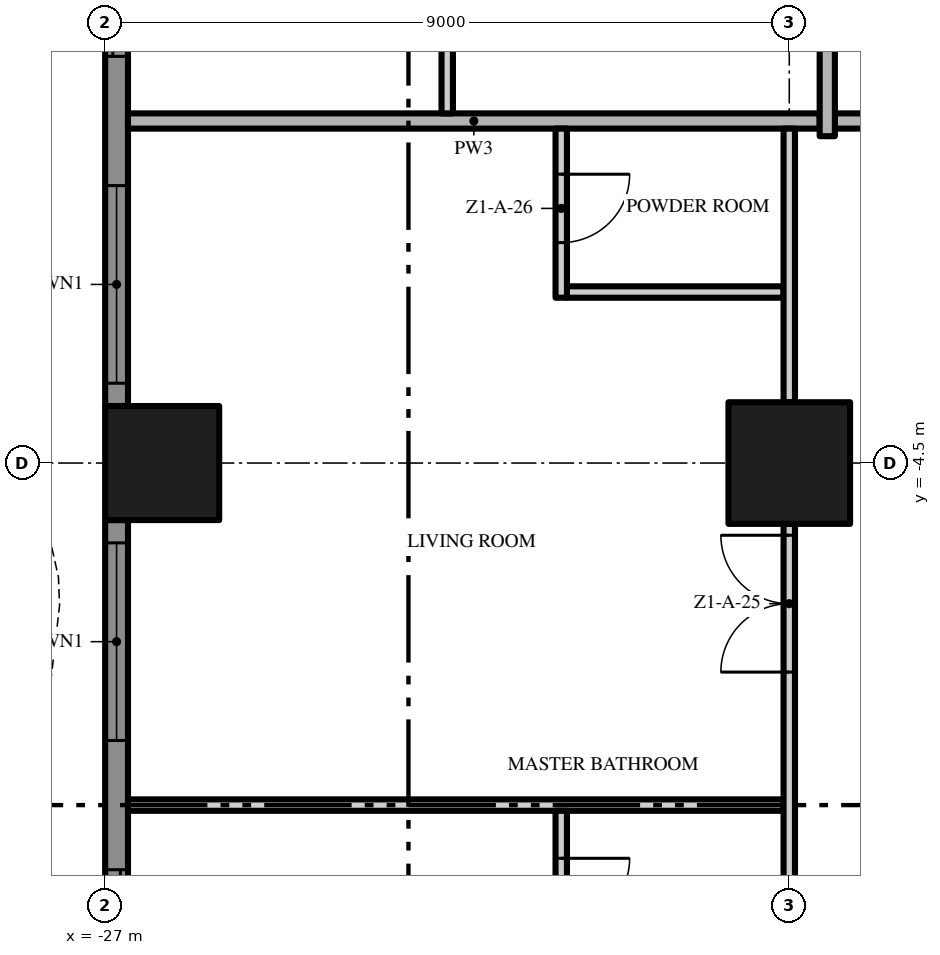
"""IFC4 building model, lengths in metres.
Left out: names, types, materials, properties, quantities, classifications, styles, units other than length and angle.
Written with IfcOpenShell. Run it as: python <this file> out.ifc"""

import sys

from ifc_helpers import new_model, si_unit, direction, frame, frame_2d, origin, origin_2d, place, context, subcontext, project, spatial, polyline, rectangle, outline, extrude, element, fill, save


model = new_model("IFC4")
c1 = context("Model", 3, precision=1e-05, world=origin(), true_north=direction((0.0, 1.0)))
c2 = subcontext(c1, "Body", "Model", "MODEL_VIEW")
j1 = project(units=[si_unit("LENGTHUNIT", "METRE"), si_unit("PLANEANGLEUNIT", "RADIAN")], contexts=[c1])
p1 = place(None, origin())
s1 = spatial("IfcSite", under=j1, at=p1, CompositionType="ELEMENT")
p2 = place(p1, origin())
s2 = spatial("IfcBuilding", under=s1, at=p2, CompositionType="ELEMENT")
p3 = place(p2, frame((0.0, 0.0, 18.8)))
s3 = spatial("IfcBuildingStorey", under=s2, at=p3, CompositionType="ELEMENT", Elevation=18.8)
p4 = place(p3, frame((-18.0, -4.5, 0.0), z_axis=(0.0, 0.0, 1.0), x_axis=(1.0, 0.0, 0.0)))
e1 = element("IfcColumn", 1, at=p4, inside=s3, PredefinedType="COLUMN", context=c2, shape_type="SweptSolid", body=[
    extrude(rectangle(XDim=1.6, YDim=1.6, at=origin_2d()), origin(), (0.0, 0.0, 1.0), 3.5),
])
p5 = place(p3, frame((-26.25, -4.5, 0.0), z_axis=(0.0, 0.0, 1.0), x_axis=(1.0, 0.0, 0.0)))
e2 = element("IfcColumn", 2, at=p5, inside=s3, PredefinedType="COLUMN", context=c2, shape_type="SweptSolid", body=[
    extrude(rectangle(XDim=1.5, YDim=1.5, at=origin_2d()), origin(), (0.0, 0.0, 1.0), 3.5),
])
p6 = place(p3, frame((-26.85, -3.75, 0.0), z_axis=(0.0, 0.0, 1.0), x_axis=(0.0, 1.0, 0.0)))
e3 = element("IfcWall", 3, at=p6, inside=s3, PredefinedType="SOLIDWALL", context=c2, shape_type="SweptSolid", body=[
    extrude(rectangle(XDim=7.5, YDim=0.3, at=frame_2d((3.75, 0.0))), origin(), (0.0, 0.0, 1.0), 3.5),
])
p7 = place(p6, frame((4.6, 0.0, 0.0)))
e4 = element("IfcOpeningElement", 4, at=p7, cuts=e3, PredefinedType="OPENING", context=c2, shape_type="SweptSolid", body=[
    extrude(rectangle(XDim=2.6, YDim=2.4, at=frame_2d((1.3, 1.2))), frame((0.0, 0.16, 0.0), z_axis=(0.0, -1.0, 0.0), x_axis=(1.0, 0.0, 0.0)), (0.0, 0.0, 1.0), 0.32),
])
p8 = place(p6, frame((0.3, 0.0, 0.45)))
e5 = element("IfcOpeningElement", 5, at=p8, cuts=e3, PredefinedType="OPENING", context=c2, shape_type="SweptSolid", body=[
    extrude(rectangle(XDim=2.6, YDim=2.65, at=frame_2d((1.3, 1.325))), frame((0.0, 0.16, 0.0), z_axis=(0.0, -1.0, 0.0), x_axis=(1.0, 0.0, 0.0)), (0.0, 0.0, 1.0), 0.32),
])
p9 = place(p3, frame((-26.85, -12.75, 0.0), z_axis=(0.0, 0.0, 1.0), x_axis=(0.0, 1.0, 0.0)))
e6 = element("IfcWall", 6, at=p9, inside=s3, PredefinedType="SOLIDWALL", context=c2, shape_type="SweptSolid", body=[
    extrude(rectangle(XDim=7.5, YDim=0.3, at=frame_2d((3.75, 0.0))), origin(), (0.0, 0.0, 1.0), 3.5),
])
p10 = place(p9, frame((4.6, 0.0, 0.45)))
e7 = element("IfcOpeningElement", 7, at=p10, cuts=e6, PredefinedType="OPENING", context=c2, shape_type="SweptSolid", body=[
    extrude(rectangle(XDim=2.6, YDim=2.65, at=frame_2d((1.3, 1.325))), frame((0.0, 0.16, 0.0), z_axis=(0.0, -1.0, 0.0), x_axis=(1.0, 0.0, 0.0)), (0.0, 0.0, 1.0), 0.32),
])
p11 = place(p9, frame((0.3, 0.0, 0.0)))
e8 = element("IfcOpeningElement", 8, at=p11, cuts=e6, PredefinedType="OPENING", context=c2, shape_type="SweptSolid", body=[
    extrude(rectangle(XDim=2.6, YDim=2.4, at=frame_2d((1.3, 1.2))), frame((0.0, 0.16, 0.0), z_axis=(0.0, -1.0, 0.0), x_axis=(1.0, 0.0, 0.0)), (0.0, 0.0, 1.0), 0.32),
])
p12 = place(p3, origin())
e9 = element("IfcWall", 9, at=p12, inside=s3, PredefinedType="USERDEFINED", context=c2, shape_type="SweptSolid", body=[
    extrude(outline(polyline([(-29.649, 18.0), (-29.985, 16.5), (-30.0, 16.125), (-29.869, 15.0), (-29.345, 13.5), (-28.612, 12.0), (-27.951, 10.5), (-27.615, 9.0), (-27.6, 8.625), (-27.731, 7.5), (-28.255, 6.0), (-28.988, 4.5), (-29.649, 3.0), (-29.985, 1.5), (-30.0, 1.125), (-29.869, 0.0), (-29.345, -1.5), (-28.612, -3.0), (-27.951, -4.5), (-27.615, -6.0), (-27.6, -6.375), (-27.731, -7.5), (-28.255, -9.0), (-28.988, -10.5), (-29.649, -12.0), (-29.985, -13.5), (-30.0, -13.875), (-29.869, -15.0), (-29.345, -16.5), (-28.612, -18.0), (-28.388, -17.89), (-29.114, -16.404), (-29.624, -14.944), (-29.749, -13.865), (-29.736, -13.533), (-29.41, -12.079), (-28.761, -10.605), (-28.024, -9.096), (-27.486, -7.556), (-27.349, -6.385), (-27.366, -5.967), (-27.713, -4.421), (-28.385, -2.895), (-29.114, -1.404), (-29.624, 0.056), (-29.749, 1.135), (-29.736, 1.467), (-29.41, 2.921), (-28.761, 4.395), (-28.024, 5.904), (-27.486, 7.444), (-27.349, 8.615), (-27.366, 9.033), (-27.713, 10.579), (-28.385, 12.105), (-29.114, 13.596), (-29.624, 15.056), (-29.749, 16.135), (-29.736, 16.467), (-29.405, 17.945), (-29.649, 18.0)])), origin(), (0.0, 0.0, 1.0), 0.9),
])
p13 = place(p3, frame((-26.7, -9.0, 0.0), z_axis=(0.0, 0.0, 1.0), x_axis=(1.0, 0.0, 0.0)))
e10 = element("IfcWall", 10, at=p13, inside=s3, PredefinedType="PARTITIONING", context=c2, shape_type="SweptSolid", body=[
    extrude(rectangle(XDim=8.625, YDim=0.15, at=frame_2d((4.312, 0.0))), origin(), (0.0, 0.0, 1.0), 3.5),
])
p14 = place(p3, frame((-20.925, -2.25, 0.0), z_axis=(0.0, 0.0, 1.0), x_axis=(1.0, 0.0, 0.0)))
e11 = element("IfcWall", 11, at=p14, inside=s3, PredefinedType="PARTITIONING", context=c2, shape_type="SweptSolid", body=[
    extrude(rectangle(XDim=2.85, YDim=0.15, at=frame_2d((1.425, 0.0))), origin(), (0.0, 0.0, 1.0), 3.5),
])
p15 = place(p3, frame((-17.4, 0.0, 0.0), z_axis=(0.0, 0.0, 1.0), x_axis=(1.0, 0.0, 0.0)))
e12 = element("IfcWall", 12, at=p15, inside=s3, PredefinedType="PARTITIONING", context=c2, shape_type="SweptSolid", body=[
    extrude(rectangle(XDim=12.8, YDim=0.2, at=frame_2d((6.4, 0.0))), origin(), (0.0, 0.0, 1.0), 3.5),
])
p16 = place(p3, frame((-26.7, 0.0, 0.0), z_axis=(0.0, 0.0, 1.0), x_axis=(1.0, 0.0, 0.0)))
e13 = element("IfcWall", 13, at=p16, inside=s3, PredefinedType="PARTITIONING", context=c2, shape_type="SweptSolid", body=[
    extrude(rectangle(XDim=9.1, YDim=0.2, at=frame_2d((4.55, 0.0))), origin(), (0.0, 0.0, 1.0), 3.5),
])
p17 = place(p3, frame((-22.5, 0.1, 0.0), z_axis=(0.0, 0.0, 1.0), x_axis=(0.0, 1.0, 0.0)))
e14 = element("IfcWall", 14, at=p17, inside=s3, PredefinedType="PARTITIONING", context=c2, shape_type="SweptSolid", body=[
    extrude(rectangle(XDim=17.15, YDim=0.15, at=frame_2d((8.575, 0.0))), origin(), (0.0, 0.0, 1.0), 3.5),
])
p18 = place(p17, frame((1.65, 0.0, 0.0)))
e15 = element("IfcOpeningElement", 15, at=p18, cuts=e14, PredefinedType="OPENING", context=c2, shape_type="SweptSolid", body=[
    extrude(rectangle(XDim=1.0, YDim=2.4, at=frame_2d((0.5, 1.2))), frame((0.0, 0.085, 0.0), z_axis=(0.0, -1.0, 0.0), x_axis=(1.0, 0.0, 0.0)), (0.0, 0.0, 1.0), 0.17),
])
p19 = place(p17, frame((7.25, 0.0, 0.0)))
e16 = element("IfcOpeningElement", 16, at=p19, cuts=e14, PredefinedType="OPENING", context=c2, shape_type="SweptSolid", body=[
    extrude(rectangle(XDim=1.0, YDim=2.4, at=frame_2d((0.5, 1.2))), frame((0.0, 0.085, 0.0), z_axis=(0.0, -1.0, 0.0), x_axis=(1.0, 0.0, 0.0)), (0.0, 0.0, 1.0), 0.17),
])
p20 = place(p17, frame((9.5, 0.0, 0.0)))
e17 = element("IfcOpeningElement", 17, at=p20, cuts=e14, PredefinedType="OPENING", context=c2, shape_type="SweptSolid", body=[
    extrude(rectangle(XDim=1.0, YDim=2.4, at=frame_2d((0.5, 1.2))), frame((0.0, 0.085, 0.0), z_axis=(0.0, -1.0, 0.0), x_axis=(1.0, 0.0, 0.0)), (0.0, 0.0, 1.0), 0.17),
])
p21 = place(p17, frame((16.0, 0.0, 0.0)))
e18 = element("IfcOpeningElement", 18, at=p21, cuts=e14, PredefinedType="OPENING", context=c2, shape_type="SweptSolid", body=[
    extrude(rectangle(XDim=1.0, YDim=2.4, at=frame_2d((0.5, 1.2))), frame((0.0, 0.085, 0.0), z_axis=(0.0, -1.0, 0.0), x_axis=(1.0, 0.0, 0.0)), (0.0, 0.0, 1.0), 0.17),
])
p22 = place(p3, frame((-21.0, -9.075, 0.0), z_axis=(0.0, 0.0, 1.0), x_axis=(0.0, -1.0, 0.0)))
e19 = element("IfcWall", 19, at=p22, inside=s3, PredefinedType="PARTITIONING", context=c2, shape_type="SweptSolid", body=[
    extrude(rectangle(XDim=2.25, YDim=0.15, at=frame_2d((1.125, 0.0))), origin(), (0.0, 0.0, 1.0), 3.5),
])
p23 = place(p22, frame((0.625, 0.0, 0.0)))
e20 = element("IfcOpeningElement", 20, at=p23, cuts=e19, PredefinedType="OPENING", context=c2, shape_type="SweptSolid", body=[
    extrude(rectangle(XDim=0.9, YDim=2.1, at=frame_2d((0.45, 1.05))), frame((0.0, 0.085, 0.0), z_axis=(0.0, -1.0, 0.0), x_axis=(1.0, 0.0, 0.0)), (0.0, 0.0, 1.0), 0.17),
])
p24 = place(p3, frame((-21.0, -0.1, 0.0), z_axis=(0.0, 0.0, 1.0), x_axis=(0.0, -1.0, 0.0)))
e21 = element("IfcWall", 21, at=p24, inside=s3, PredefinedType="PARTITIONING", context=c2, shape_type="SweptSolid", body=[
    extrude(rectangle(XDim=2.225, YDim=0.15, at=frame_2d((1.113, 0.0))), origin(), (0.0, 0.0, 1.0), 3.5),
])
p25 = place(p24, frame((0.6, 0.0, 0.0)))
e22 = element("IfcOpeningElement", 22, at=p25, cuts=e21, PredefinedType="OPENING", context=c2, shape_type="SweptSolid", body=[
    extrude(rectangle(XDim=0.9, YDim=2.1, at=frame_2d((0.45, 1.05))), frame((0.0, 0.085, 0.0), z_axis=(0.0, -1.0, 0.0), x_axis=(1.0, 0.0, 0.0)), (0.0, 0.0, 1.0), 0.17),
])
p26 = place(p3, frame((-18.0, -12.7, 0.0), z_axis=(0.0, 0.0, 1.0), x_axis=(0.0, 1.0, 0.0)))
e23 = element("IfcWall", 23, at=p26, inside=s3, PredefinedType="PARTITIONING", context=c2, shape_type="SweptSolid", body=[
    extrude(rectangle(XDim=7.4, YDim=0.15, at=frame_2d((3.7, 0.0))), origin(), (0.0, 0.0, 1.0), 3.5),
])
p27 = place(p26, frame((5.45, 0.0, 0.0)))
e24 = element("IfcOpeningElement", 24, at=p27, cuts=e23, PredefinedType="OPENING", context=c2, shape_type="SweptSolid", body=[
    extrude(rectangle(XDim=1.8, YDim=2.4, at=frame_2d((0.9, 1.2))), frame((0.0, 0.085, 0.0), z_axis=(0.0, -1.0, 0.0), x_axis=(1.0, 0.0, 0.0)), (0.0, 0.0, 1.0), 0.17),
])
p28 = place(p26, frame((0.15, 0.0, 0.0)))
e25 = element("IfcOpeningElement", 25, at=p28, cuts=e23, PredefinedType="OPENING", context=c2, shape_type="SweptSolid", body=[
    extrude(rectangle(XDim=1.0, YDim=2.4, at=frame_2d((0.5, 1.2))), frame((0.0, 0.085, 0.0), z_axis=(0.0, -1.0, 0.0), x_axis=(1.0, 0.0, 0.0)), (0.0, 0.0, 1.0), 0.17),
])
p29 = place(p3, frame((-18.0, -3.7, 0.0), z_axis=(0.0, 0.0, 1.0), x_axis=(0.0, 1.0, 0.0)))
e26 = element("IfcWall", 26, at=p29, inside=s3, PredefinedType="PARTITIONING", context=c2, shape_type="SweptSolid", body=[
    extrude(rectangle(XDim=3.6, YDim=0.15, at=frame_2d((1.8, 0.0))), origin(), (0.0, 0.0, 1.0), 3.5),
])
p30 = place(p3, frame((-17.5, -0.2, 0.0), z_axis=(0.0, 0.0, 1.0), x_axis=(0.0, 1.0, 0.0)))
e27 = element("IfcWall", 27, at=p30, inside=s3, PredefinedType="PARTITIONING", context=c2, shape_type="SweptSolid", body=[
    extrude(rectangle(XDim=3.9, YDim=0.2, at=frame_2d((1.95, 0.0))), origin(), (0.0, 0.0, 1.0), 3.5),
])
p31 = place(p7, origin())
e28 = element("IfcDoor", 28, at=p31, inside=s3, OperationType="SINGLE_SWING_LEFT", PredefinedType="DOOR", context=c2, shape_type="SweptSolid", body=[
    extrude(rectangle(XDim=2.6, YDim=2.4, at=frame_2d((1.3, 1.2))), frame((0.0, 0.025, 0.0), z_axis=(0.0, -1.0, 0.0), x_axis=(1.0, 0.0, 0.0)), (0.0, 0.0, 1.0), 0.05),
])
fill(e4, e28)
p32 = place(p8, origin())
e29 = element("IfcWindow", 29, at=p32, inside=s3, PartitioningType="SINGLE_PANEL", PredefinedType="WINDOW", context=c2, shape_type="SweptSolid", body=[
    extrude(rectangle(XDim=2.6, YDim=2.65, at=frame_2d((1.3, 1.325))), frame((0.0, 0.03, 0.0), z_axis=(0.0, -1.0, 0.0), x_axis=(1.0, 0.0, 0.0)), (0.0, 0.0, 1.0), 0.06),
])
fill(e5, e29)
p33 = place(p10, origin())
e30 = element("IfcWindow", 30, at=p33, inside=s3, PartitioningType="SINGLE_PANEL", PredefinedType="WINDOW", context=c2, shape_type="SweptSolid", body=[
    extrude(rectangle(XDim=2.6, YDim=2.65, at=frame_2d((1.3, 1.325))), frame((0.0, 0.03, 0.0), z_axis=(0.0, -1.0, 0.0), x_axis=(1.0, 0.0, 0.0)), (0.0, 0.0, 1.0), 0.06),
])
fill(e7, e30)
p34 = place(p11, origin())
e31 = element("IfcDoor", 31, at=p34, inside=s3, OperationType="SINGLE_SWING_LEFT", PredefinedType="DOOR", context=c2, shape_type="SweptSolid", body=[
    extrude(rectangle(XDim=2.6, YDim=2.4, at=frame_2d((1.3, 1.2))), frame((0.0, 0.025, 0.0), z_axis=(0.0, -1.0, 0.0), x_axis=(1.0, 0.0, 0.0)), (0.0, 0.0, 1.0), 0.05),
])
fill(e8, e31)
p35 = place(p27, origin())
e32 = element("IfcDoor", 32, at=p35, inside=s3, OperationType="DOUBLE_DOOR_SINGLE_SWING", PredefinedType="DOOR", context=c2, shape_type="SweptSolid", body=[
    extrude(rectangle(XDim=1.8, YDim=2.4, at=frame_2d((0.9, 1.2))), frame((0.0, 0.025, 0.0), z_axis=(0.0, -1.0, 0.0), x_axis=(1.0, 0.0, 0.0)), (0.0, 0.0, 1.0), 0.05),
])
fill(e24, e32)
p36 = place(p25, origin())
e33 = element("IfcDoor", 33, at=p36, inside=s3, OperationType="SINGLE_SWING_LEFT", PredefinedType="DOOR", context=c2, shape_type="SweptSolid", body=[
    extrude(rectangle(XDim=0.9, YDim=2.1, at=frame_2d((0.45, 1.05))), frame((0.0, 0.025, 0.0), z_axis=(0.0, -1.0, 0.0), x_axis=(1.0, 0.0, 0.0)), (0.0, 0.0, 1.0), 0.05),
])
fill(e22, e33)
p37 = place(p23, origin())
e34 = element("IfcDoor", 34, at=p37, inside=s3, OperationType="SINGLE_SWING_LEFT", PredefinedType="DOOR", context=c2, shape_type="SweptSolid", body=[
    extrude(rectangle(XDim=0.9, YDim=2.1, at=frame_2d((0.45, 1.05))), frame((0.0, 0.025, 0.0), z_axis=(0.0, -1.0, 0.0), x_axis=(1.0, 0.0, 0.0)), (0.0, 0.0, 1.0), 0.05),
])
fill(e20, e34)
save(model, sys.argv[1])
